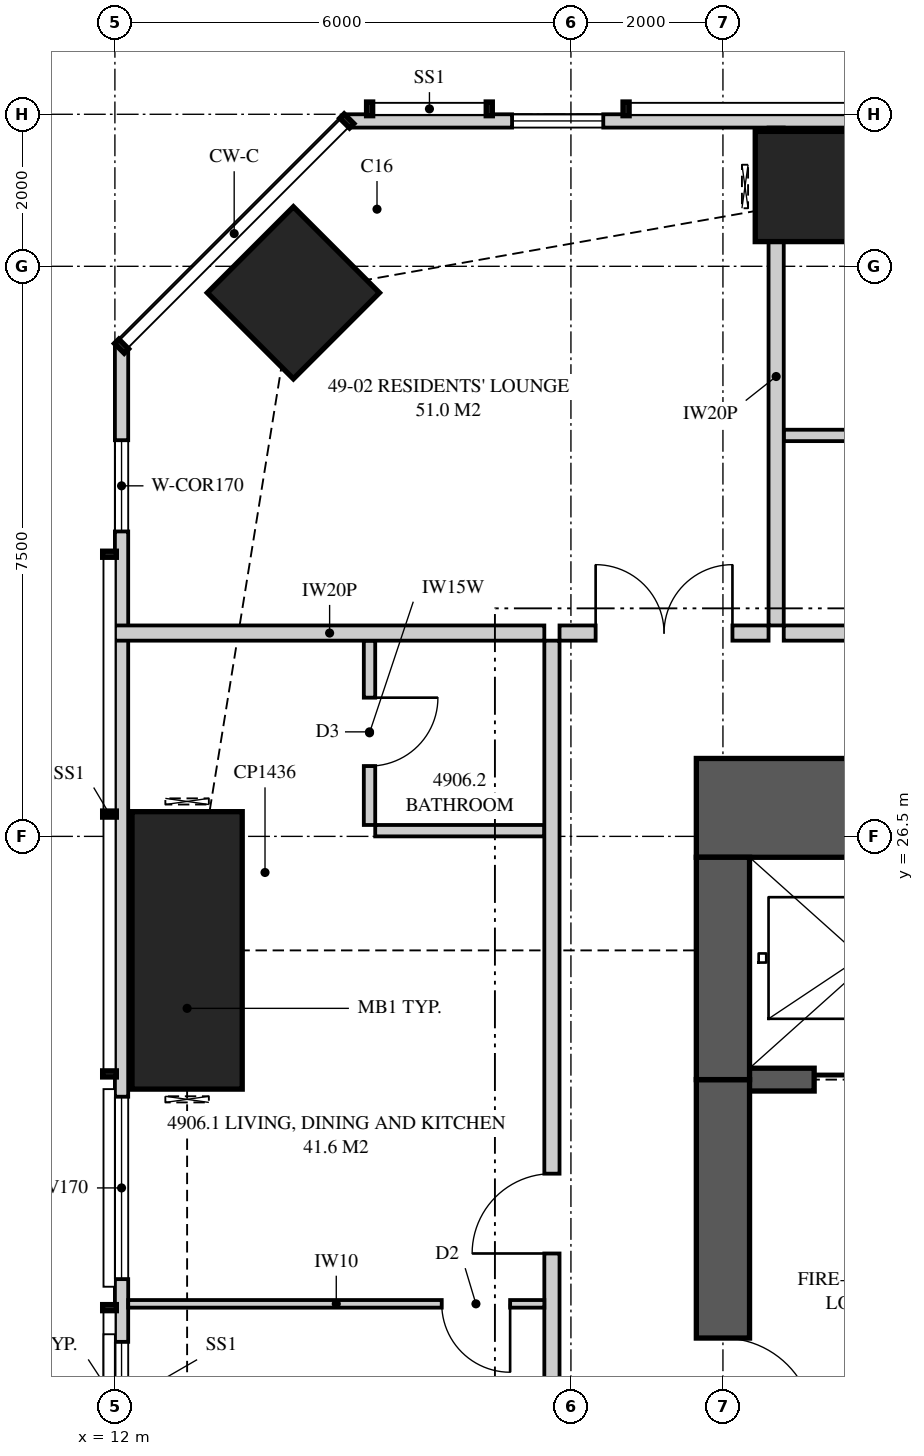
"""IFC4 building model, lengths in metres.
Left out: names, types, materials, properties, quantities, classifications, styles, units other than length and angle.
Written with IfcOpenShell. Run it as: python <this file> out.ifc"""

import sys

from ifc_helpers import new_model, si_unit, direction, frame, frame_2d, origin, origin_2d, place, context, subcontext, project, spatial, polyline, rectangle, outline, extrude, element, fill, save


model = new_model("IFC4")
c1 = context("Model", 3, precision=1e-05, world=origin(), true_north=direction((0.0, 1.0)))
c2 = subcontext(c1, "Body", "Model", "MODEL_VIEW")
j1 = project(units=[si_unit("LENGTHUNIT", "METRE"), si_unit("PLANEANGLEUNIT", "RADIAN")], contexts=[c1])
p1 = place(None, origin())
s1 = spatial("IfcSite", under=j1, at=p1, CompositionType="ELEMENT")
p2 = place(p1, origin())
s2 = spatial("IfcBuilding", under=s1, at=p2, CompositionType="ELEMENT")
p3 = place(p2, frame((0.0, 0.0, 181.15)))
s3 = spatial("IfcBuildingStorey", under=s2, at=p3, CompositionType="ELEMENT", Elevation=181.15)
p4 = place(p3, frame((22.25, 35.05, 0.0), z_axis=(0.0, 0.0, 1.0), x_axis=(0.0, 1.0, 0.0)))
e1 = element("IfcColumn", 1, at=p4, inside=s3, PredefinedType="COLUMN", context=c2, shape_type="SweptSolid", body=[
    extrude(rectangle(XDim=1.45, YDim=3.65, at=origin_2d()), origin(), (0.0, 0.0, 1.0), 3.35),
])
p5 = place(p3, frame((14.348, 33.652, 0.0), z_axis=(0.0, 0.0, 1.0), x_axis=(0.707106781187, 0.707106781187, 0.0)))
e2 = element("IfcColumn", 2, at=p5, inside=s3, PredefinedType="COLUMN", context=c2, shape_type="SweptSolid", body=[
    extrude(rectangle(XDim=1.6, YDim=1.6, at=origin_2d()), origin(), (0.0, 0.0, 1.0), 3.35),
])
p6 = place(p3, frame((12.95, 25.0, 0.0), z_axis=(0.0, 0.0, 1.0), x_axis=(1.0, 0.0, 0.0)))
e3 = element("IfcColumn", 3, at=p6, inside=s3, PredefinedType="COLUMN", context=c2, shape_type="SweptSolid", body=[
    extrude(rectangle(XDim=1.45, YDim=3.65, at=origin_2d()), origin(), (0.0, 0.0, 1.0), 3.35),
])
p7 = place(p3, frame((26.0, 26.875, 0.0), z_axis=(0.0, 0.0, 1.0), x_axis=(-1.0, 0.0, 0.0)))
e4 = element("IfcWall", 4, at=p7, inside=s3, PredefinedType="SHEAR", context=c2, shape_type="SweptSolid", body=[
    extrude(rectangle(XDim=6.35, YDim=1.3, at=frame_2d((3.175, 0.0))), origin(), (0.0, 0.0, 1.0), 3.35),
])
p8 = place(p7, frame((0.825, 0.0, 0.0)))
e5 = element("IfcOpeningElement", 5, at=p8, cuts=e4, PredefinedType="OPENING", context=c2, shape_type="SweptSolid", body=[
    extrude(rectangle(XDim=0.75, YDim=2.1, at=frame_2d((0.375, 1.05))), frame((0.0, 0.66, 0.0), z_axis=(0.0, -1.0, 0.0), x_axis=(1.0, 0.0, 0.0)), (0.0, 0.0, 1.0), 1.32),
])
p9 = place(p3, frame((20.0, 26.225, 0.0), z_axis=(0.0, 0.0, 1.0), x_axis=(0.0, -1.0, 0.0)))
e6 = element("IfcWall", 6, at=p9, inside=s3, PredefinedType="SHEAR", context=c2, shape_type="SweptSolid", body=[
    extrude(rectangle(XDim=2.925, YDim=0.7, at=frame_2d((1.462, 0.0))), origin(), (0.0, 0.0, 1.0), 3.35),
])
p10 = place(p3, frame((20.0, 23.3, 0.0), z_axis=(0.0, 0.0, 1.0), x_axis=(0.0, -1.0, 0.0)))
e7 = element("IfcWall", 7, at=p10, inside=s3, PredefinedType="SHEAR", context=c2, shape_type="SweptSolid", body=[
    extrude(rectangle(XDim=5.6, YDim=0.7, at=frame_2d((2.8, 0.0))), origin(), (0.0, 0.0, 1.0), 3.35),
])
p11 = place(p10, frame((3.4, 0.0, 0.0)))
e8 = element("IfcOpeningElement", 8, at=p11, cuts=e7, PredefinedType="OPENING", context=c2, shape_type="SweptSolid", body=[
    extrude(rectangle(XDim=1.2, YDim=2.2, at=frame_2d((0.6, 1.1))), frame((0.0, 0.36, 0.0), z_axis=(0.0, -1.0, 0.0), x_axis=(1.0, 0.0, 0.0)), (0.0, 0.0, 1.0), 0.72),
])
p12 = place(p3, frame((20.0, 23.3, 0.0), z_axis=(0.0, 0.0, 1.0), x_axis=(1.0, 0.0, 0.0)))
e9 = element("IfcWall", 9, at=p12, inside=s3, PredefinedType="SHEAR", context=c2, shape_type="SweptSolid", body=[
    extrude(rectangle(XDim=3.6, YDim=0.3, at=frame_2d((1.8, 0.0))), origin(), (0.0, 0.0, 1.0), 3.35),
])
p13 = place(p12, frame((1.2, 0.0, 0.0)))
e10 = element("IfcOpeningElement", 10, at=p13, cuts=e9, PredefinedType="OPENING", context=c2, shape_type="SweptSolid", body=[
    extrude(rectangle(XDim=1.2, YDim=2.1, at=frame_2d((0.6, 1.05))), frame((0.0, 0.16, 0.0), z_axis=(0.0, -1.0, 0.0), x_axis=(1.0, 0.0, 0.0)), (0.0, 0.0, 1.0), 0.32),
])
p14 = place(p3, frame((49.949, 35.913, 0.0), z_axis=(0.0, 0.0, 1.0), x_axis=(-1.0, 0.0, 0.0)))
e11 = element("IfcWall", 11, at=p14, inside=s3, PredefinedType="SOLIDWALL", context=c2, shape_type="SweptSolid", body=[
    extrude(outline(polyline([(0.0, 0.0), (34.897, 0.0), (34.897, 3.11), (27.91, 3.11), (27.91, 2.15), (27.836, 2.15), (27.836, 3.11), (27.699, 3.11), (27.699, 2.15), (7.199, 2.15), (7.199, 3.11), (7.062, 3.11), (7.062, 2.15), (6.987, 2.15), (6.987, 3.11), (0.0, 3.11), (0.0, 0.0)])), frame((0.0, 0.087, 0.0), z_axis=(0.0, -1.0, 0.0), x_axis=(1.0, 0.0, 0.0)), (0.0, 0.0, 1.0), 0.175),
])
p15 = place(p14, frame((2.149, 0.0, 0.4)))
e12 = element("IfcOpeningElement", 12, at=p15, cuts=e11, PredefinedType="OPENING", context=c2, shape_type="SweptSolid", body=[
    extrude(rectangle(XDim=1.8, YDim=1.7, at=frame_2d((0.9, 0.85))), frame((0.0, 0.097, 0.0), z_axis=(0.0, -1.0, 0.0), x_axis=(1.0, 0.0, 0.0)), (0.0, 0.0, 1.0), 0.195),
])
p16 = place(p14, frame((9.13, 0.0, 0.4)))
e13 = element("IfcOpeningElement", 13, at=p16, cuts=e11, PredefinedType="OPENING", context=c2, shape_type="SweptSolid", body=[
    extrude(rectangle(XDim=1.2, YDim=1.7, at=frame_2d((0.6, 0.85))), frame((0.0, 0.097, 0.0), z_axis=(0.0, -1.0, 0.0), x_axis=(1.0, 0.0, 0.0)), (0.0, 0.0, 1.0), 0.195),
])
p17 = place(p14, frame((13.174, 0.0, 0.0)))
e14 = element("IfcOpeningElement", 14, at=p17, cuts=e11, PredefinedType="OPENING", context=c2, shape_type="SweptSolid", body=[
    extrude(rectangle(XDim=1.8, YDim=2.1, at=frame_2d((0.9, 1.05))), frame((0.0, 0.097, 0.0), z_axis=(0.0, -1.0, 0.0), x_axis=(1.0, 0.0, 0.0)), (0.0, 0.0, 1.0), 0.195),
])
p18 = place(p14, frame((20.724, 0.0, 0.4)))
e15 = element("IfcOpeningElement", 15, at=p18, cuts=e11, PredefinedType="OPENING", context=c2, shape_type="SweptSolid", body=[
    extrude(rectangle(XDim=1.8, YDim=1.7, at=frame_2d((0.9, 0.85))), frame((0.0, 0.097, 0.0), z_axis=(0.0, -1.0, 0.0), x_axis=(1.0, 0.0, 0.0)), (0.0, 0.0, 1.0), 0.195),
])
p19 = place(p14, frame((23.929, 0.0, 0.4)))
e16 = element("IfcOpeningElement", 16, at=p19, cuts=e11, PredefinedType="OPENING", context=c2, shape_type="SweptSolid", body=[
    extrude(rectangle(XDim=1.8, YDim=1.7, at=frame_2d((0.9, 0.85))), frame((0.0, 0.097, 0.0), z_axis=(0.0, -1.0, 0.0), x_axis=(1.0, 0.0, 0.0)), (0.0, 0.0, 1.0), 0.195),
])
p20 = place(p14, frame((31.523, 0.0, 0.4)))
e17 = element("IfcOpeningElement", 17, at=p20, cuts=e11, PredefinedType="OPENING", context=c2, shape_type="SweptSolid", body=[
    extrude(rectangle(XDim=1.2, YDim=1.7, at=frame_2d((0.6, 0.85))), frame((0.0, 0.097, 0.0), z_axis=(0.0, -1.0, 0.0), x_axis=(1.0, 0.0, 0.0)), (0.0, 0.0, 1.0), 0.195),
])
p21 = place(p3, frame((12.087, 32.949, 0.0), z_axis=(0.0, 0.0, 1.0), x_axis=(0.0, -1.0, 0.0)))
e18 = element("IfcWall", 18, at=p21, inside=s3, PredefinedType="SOLIDWALL", context=c2, shape_type="SweptSolid", body=[
    extrude(outline(polyline([(0.0, 0.0), (29.897, 0.0), (29.897, 3.11), (20.191, 3.11), (20.191, 2.15), (20.051, 2.15), (20.051, 3.11), (19.949, 3.11), (19.949, 2.15), (7.949, 2.15), (7.949, 3.11), (7.823, 3.11), (7.823, 2.15), (7.73, 2.15), (7.73, 3.11), (0.0, 3.11), (0.0, 0.0)])), frame((0.0, 0.087, 0.0), z_axis=(0.0, -1.0, 0.0), x_axis=(1.0, 0.0, 0.0)), (0.0, 0.0, 1.0), 0.175),
])
p22 = place(p21, frame((1.237, 0.0, 0.4)))
e19 = element("IfcOpeningElement", 19, at=p22, cuts=e18, PredefinedType="OPENING", context=c2, shape_type="SweptSolid", body=[
    extrude(rectangle(XDim=1.2, YDim=1.7, at=frame_2d((0.6, 0.85))), frame((0.0, 0.097, 0.0), z_axis=(0.0, -1.0, 0.0), x_axis=(1.0, 0.0, 0.0)), (0.0, 0.0, 1.0), 0.195),
])
p23 = place(p21, frame((9.874, 0.0, 0.4)))
e20 = element("IfcOpeningElement", 20, at=p23, cuts=e18, PredefinedType="OPENING", context=c2, shape_type="SweptSolid", body=[
    extrude(rectangle(XDim=2.4, YDim=1.7, at=frame_2d((1.2, 0.85))), frame((0.0, 0.097, 0.0), z_axis=(0.0, -1.0, 0.0), x_axis=(1.0, 0.0, 0.0)), (0.0, 0.0, 1.0), 0.195),
])
p24 = place(p21, frame((13.099, 0.0, 0.4)))
e21 = element("IfcOpeningElement", 21, at=p24, cuts=e18, PredefinedType="OPENING", context=c2, shape_type="SweptSolid", body=[
    extrude(rectangle(XDim=1.8, YDim=1.7, at=frame_2d((0.9, 0.85))), frame((0.0, 0.097, 0.0), z_axis=(0.0, -1.0, 0.0), x_axis=(1.0, 0.0, 0.0)), (0.0, 0.0, 1.0), 0.195),
])
p25 = place(p21, frame((16.219, 0.0, 0.4)))
e22 = element("IfcOpeningElement", 22, at=p25, cuts=e18, PredefinedType="OPENING", context=c2, shape_type="SweptSolid", body=[
    extrude(rectangle(XDim=1.8, YDim=1.7, at=frame_2d((0.9, 0.85))), frame((0.0, 0.097, 0.0), z_axis=(0.0, -1.0, 0.0), x_axis=(1.0, 0.0, 0.0)), (0.0, 0.0, 1.0), 0.195),
])
p26 = place(p21, frame((22.624, 0.0, 0.0)))
e23 = element("IfcOpeningElement", 23, at=p26, cuts=e18, PredefinedType="OPENING", context=c2, shape_type="SweptSolid", body=[
    extrude(rectangle(XDim=1.8, YDim=2.1, at=frame_2d((0.9, 1.05))), frame((0.0, 0.097, 0.0), z_axis=(0.0, -1.0, 0.0), x_axis=(1.0, 0.0, 0.0)), (0.0, 0.0, 1.0), 0.195),
])
p27 = place(p3, frame((20.7, 35.825, 0.0), z_axis=(0.0, 0.0, 1.0), x_axis=(0.0, -1.0, 0.0)))
e24 = element("IfcWall", 24, at=p27, inside=s3, PredefinedType="PARTITIONING", context=c2, shape_type="SweptSolid", body=[
    extrude(outline(polyline([(0.0, 0.0), (6.55, 0.0), (6.55, 3.11), (1.973, 3.11), (1.973, 2.15), (0.125, 2.15), (0.125, 3.11), (0.0, 3.11), (0.0, 0.0)])), frame((0.0, 0.1, 0.0), z_axis=(0.0, -1.0, 0.0), x_axis=(1.0, 0.0, 0.0)), (0.0, 0.0, 1.0), 0.2),
])
p28 = place(p3, frame((17.85, 29.175, 0.0), z_axis=(0.0, 0.0, 1.0), x_axis=(1.0, 0.0, 0.0)))
e25 = element("IfcWall", 25, at=p28, inside=s3, PredefinedType="PARTITIONING", context=c2, shape_type="SweptSolid", body=[
    extrude(rectangle(XDim=2.75, YDim=0.2, at=frame_2d((1.375, 0.0))), origin(), (0.0, 0.0, 1.0), 3.11),
])
p29 = place(p28, frame((0.475, 0.0, 0.0)))
e26 = element("IfcOpeningElement", 26, at=p29, cuts=e25, PredefinedType="OPENING", context=c2, shape_type="SweptSolid", body=[
    extrude(rectangle(XDim=1.8, YDim=2.1, at=frame_2d((0.9, 1.05))), frame((0.0, 0.11, 0.0), z_axis=(0.0, -1.0, 0.0), x_axis=(1.0, 0.0, 0.0)), (0.0, 0.0, 1.0), 0.22),
])
p30 = place(p3, frame((20.8, 29.175, 0.0), z_axis=(0.0, 0.0, 1.0), x_axis=(1.0, 0.0, 0.0)))
e27 = element("IfcWall", 27, at=p30, inside=s3, PredefinedType="PARTITIONING", context=c2, shape_type="SweptSolid", body=[
    extrude(outline(polyline([(0.0, 0.0), (14.85, 0.0), (14.85, 3.11), (12.037, 3.11), (12.037, 2.541), (11.363, 2.541), (11.363, 3.11), (1.787, 3.11), (1.787, 2.541), (1.113, 2.541), (1.113, 3.11), (0.0, 3.11), (0.0, 0.0)])), frame((0.0, 0.1, 0.0), z_axis=(0.0, -1.0, 0.0), x_axis=(1.0, 0.0, 0.0)), (0.0, 0.0, 1.0), 0.2),
])
p31 = place(p3, frame((20.8, 31.775, 0.0), z_axis=(0.0, 0.0, 1.0), x_axis=(1.0, 0.0, 0.0)))
e28 = element("IfcWall", 28, at=p31, inside=s3, PredefinedType="PLUMBINGWALL", context=c2, shape_type="SweptSolid", body=[
    extrude(outline(polyline([(0.0, 0.0), (5.65, 0.0), (5.65, 3.11), (1.762, 3.11), (1.762, 2.541), (1.138, 2.541), (1.138, 3.11), (0.0, 3.11), (0.0, 0.0)])), frame((0.0, 0.075, 0.0), z_axis=(0.0, -1.0, 0.0), x_axis=(1.0, 0.0, 0.0)), (0.0, 0.0, 1.0), 0.15),
])
p32 = place(p3, frame((12.0, 29.175, 0.0), z_axis=(0.0, 0.0, 1.0), x_axis=(1.0, 0.0, 0.0)))
e29 = element("IfcWall", 29, at=p32, inside=s3, PredefinedType="PARTITIONING", context=c2, shape_type="SweptSolid", body=[
    extrude(outline(polyline([(0.0, 0.0), (5.65, 0.0), (5.65, 3.11), (2.547, 3.11), (2.547, 2.15), (0.703, 2.15), (0.703, 3.11), (0.0, 3.11), (0.0, 0.0)])), frame((0.0, 0.1, 0.0), z_axis=(0.0, -1.0, 0.0), x_axis=(1.0, 0.0, 0.0)), (0.0, 0.0, 1.0), 0.2),
])
p33 = place(p3, frame((17.75, 13.95, 0.0), z_axis=(0.0, 0.0, 1.0), x_axis=(0.0, 1.0, 0.0)))
e30 = element("IfcWall", 30, at=p33, inside=s3, PredefinedType="PARTITIONING", context=c2, shape_type="SweptSolid", body=[
    extrude(outline(polyline([(0.0, 0.0), (15.125, 0.0), (15.125, 3.11), (11.387, 3.11), (11.387, 2.541), (10.713, 2.541), (10.713, 3.11), (0.0, 3.11), (0.0, 0.0)])), frame((0.0, 0.1, 0.0), z_axis=(0.0, -1.0, 0.0), x_axis=(1.0, 0.0, 0.0)), (0.0, 0.0, 1.0), 0.2),
])
p34 = place(p33, frame((7.062, 0.0, 0.0)))
e31 = element("IfcOpeningElement", 31, at=p34, cuts=e30, PredefinedType="OPENING", context=c2, shape_type="SweptSolid", body=[
    extrude(rectangle(XDim=1.05, YDim=2.2, at=frame_2d((0.525, 1.1))), frame((0.0, 0.11, 0.0), z_axis=(0.0, -1.0, 0.0), x_axis=(1.0, 0.0, 0.0)), (0.0, 0.0, 1.0), 0.22),
])
p35 = place(p3, frame((15.35, 26.65, 0.0), z_axis=(0.0, 0.0, 1.0), x_axis=(0.0, 1.0, 0.0)))
e32 = element("IfcWall", 32, at=p35, inside=s3, PredefinedType="PLUMBINGWALL", context=c2, shape_type="SweptSolid", body=[
    extrude(rectangle(XDim=2.425, YDim=0.15, at=frame_2d((1.212, 0.0))), origin(), (0.0, 0.0, 1.0), 3.11),
])
p36 = place(p35, frame((0.775, 0.0, 0.0)))
e33 = element("IfcOpeningElement", 33, at=p36, cuts=e32, PredefinedType="OPENING", context=c2, shape_type="SweptSolid", body=[
    extrude(rectangle(XDim=0.9, YDim=2.1, at=frame_2d((0.45, 1.05))), frame((0.0, 0.085, 0.0), z_axis=(0.0, -1.0, 0.0), x_axis=(1.0, 0.0, 0.0)), (0.0, 0.0, 1.0), 0.17),
])
p37 = place(p3, frame((15.425, 26.575, 0.0), z_axis=(0.0, 0.0, 1.0), x_axis=(1.0, 0.0, 0.0)))
e34 = element("IfcWall", 34, at=p37, inside=s3, PredefinedType="PLUMBINGWALL", context=c2, shape_type="SweptSolid", body=[
    extrude(rectangle(XDim=2.225, YDim=0.15, at=frame_2d((1.112, 0.0))), origin(), (0.0, 0.0, 1.0), 3.11),
])
p38 = place(p3, frame((12.175, 20.35, 0.0), z_axis=(0.0, 0.0, 1.0), x_axis=(1.0, 0.0, 0.0)))
e35 = element("IfcWall", 35, at=p38, inside=s3, PredefinedType="PARTITIONING", context=c2, shape_type="SweptSolid", body=[
    extrude(outline(polyline([(0.0, 0.0), (5.475, 0.0), (5.475, 3.11), (1.635, 3.11), (1.635, 2.15), (0.0, 2.15), (0.0, 3.11), (0.0, 0.0)])), frame((0.0, 0.05, 0.0), z_axis=(0.0, -1.0, 0.0), x_axis=(1.0, 0.0, 0.0)), (0.0, 0.0, 1.0), 0.1),
])
p39 = place(p38, frame((4.125, 0.0, 0.0)))
e36 = element("IfcOpeningElement", 36, at=p39, cuts=e35, PredefinedType="OPENING", context=c2, shape_type="SweptSolid", body=[
    extrude(rectangle(XDim=0.9, YDim=2.1, at=frame_2d((0.45, 1.05))), frame((0.0, 0.06, 0.0), z_axis=(0.0, -1.0, 0.0), x_axis=(1.0, 0.0, 0.0)), (0.0, 0.0, 1.0), 0.12),
])
p40 = place(p20, origin())
e37 = element("IfcWindow", 37, at=p40, inside=s3, PartitioningType="SINGLE_PANEL", PredefinedType="WINDOW", context=c2, shape_type="SweptSolid", body=[
    extrude(rectangle(XDim=1.2, YDim=1.7, at=frame_2d((0.6, 0.85))), frame((0.0, 0.03, 0.0), z_axis=(0.0, -1.0, 0.0), x_axis=(1.0, 0.0, 0.0)), (0.0, 0.0, 1.0), 0.06),
])
fill(e17, e37)
p41 = place(p22, origin())
e38 = element("IfcWindow", 38, at=p41, inside=s3, PartitioningType="SINGLE_PANEL", PredefinedType="WINDOW", context=c2, shape_type="SweptSolid", body=[
    extrude(rectangle(XDim=1.2, YDim=1.7, at=frame_2d((0.6, 0.85))), frame((0.0, 0.03, 0.0), z_axis=(0.0, -1.0, 0.0), x_axis=(1.0, 0.0, 0.0)), (0.0, 0.0, 1.0), 0.06),
])
fill(e19, e38)
p42 = place(p23, origin())
e39 = element("IfcWindow", 39, at=p42, inside=s3, PartitioningType="SINGLE_PANEL", PredefinedType="WINDOW", context=c2, shape_type="SweptSolid", body=[
    extrude(rectangle(XDim=2.4, YDim=1.7, at=frame_2d((1.2, 0.85))), frame((0.0, 0.03, 0.0), z_axis=(0.0, -1.0, 0.0), x_axis=(1.0, 0.0, 0.0)), (0.0, 0.0, 1.0), 0.06),
])
fill(e20, e39)
p43 = place(p24, origin())
e40 = element("IfcWindow", 40, at=p43, inside=s3, PartitioningType="SINGLE_PANEL", PredefinedType="WINDOW", context=c2, shape_type="SweptSolid", body=[
    extrude(rectangle(XDim=1.8, YDim=1.7, at=frame_2d((0.9, 0.85))), frame((0.0, 0.03, 0.0), z_axis=(0.0, -1.0, 0.0), x_axis=(1.0, 0.0, 0.0)), (0.0, 0.0, 1.0), 0.06),
])
fill(e21, e40)
p44 = place(p29, origin())
e41 = element("IfcDoor", 41, at=p44, inside=s3, OperationType="DOUBLE_DOOR_SINGLE_SWING", PredefinedType="DOOR", context=c2, shape_type="SweptSolid", body=[
    extrude(rectangle(XDim=1.8, YDim=2.1, at=frame_2d((0.9, 1.05))), frame((0.0, 0.025, 0.0), z_axis=(0.0, -1.0, 0.0), x_axis=(1.0, 0.0, 0.0)), (0.0, 0.0, 1.0), 0.05),
])
fill(e26, e41)
p45 = place(p34, origin())
e42 = element("IfcDoor", 42, at=p45, inside=s3, OperationType="SINGLE_SWING_LEFT", PredefinedType="DOOR", context=c2, shape_type="SweptSolid", body=[
    extrude(rectangle(XDim=1.05, YDim=2.2, at=frame_2d((0.525, 1.1))), frame((0.0, 0.025, 0.0), z_axis=(0.0, -1.0, 0.0), x_axis=(1.0, 0.0, 0.0)), (0.0, 0.0, 1.0), 0.05),
])
fill(e31, e42)
p46 = place(p36, frame((0.9, 0.0, 0.0), z_axis=(0.0, 0.0, 1.0), x_axis=(-1.0, 0.0, 0.0)))
e43 = element("IfcDoor", 43, at=p46, inside=s3, OperationType="SINGLE_SWING_LEFT", PredefinedType="DOOR", context=c2, shape_type="SweptSolid", body=[
    extrude(rectangle(XDim=0.9, YDim=2.1, at=frame_2d((0.45, 1.05))), frame((0.0, 0.025, 0.0), z_axis=(0.0, -1.0, 0.0), x_axis=(1.0, 0.0, 0.0)), (0.0, 0.0, 1.0), 0.05),
])
fill(e33, e43)
p47 = place(p39, frame((0.9, 0.0, 0.0), z_axis=(0.0, 0.0, 1.0), x_axis=(-1.0, 0.0, 0.0)))
e44 = element("IfcDoor", 44, at=p47, inside=s3, OperationType="SINGLE_SWING_LEFT", PredefinedType="DOOR", context=c2, shape_type="SweptSolid", body=[
    extrude(rectangle(XDim=0.9, YDim=2.1, at=frame_2d((0.45, 1.05))), frame((0.0, 0.025, 0.0), z_axis=(0.0, -1.0, 0.0), x_axis=(1.0, 0.0, 0.0)), (0.0, 0.0, 1.0), 0.05),
])
fill(e36, e44)
p48 = place(p11, origin())
e45 = element("IfcDoor", 45, at=p48, inside=s3, OperationType="SINGLE_SWING_RIGHT", PredefinedType="DOOR", context=c2, shape_type="SweptSolid", body=[
    extrude(rectangle(XDim=1.2, YDim=2.2, at=frame_2d((0.6, 1.1))), frame((0.0, 0.025, 0.0), z_axis=(0.0, -1.0, 0.0), x_axis=(1.0, 0.0, 0.0)), (0.0, 0.0, 1.0), 0.05),
])
fill(e8, e45)
p49 = place(p13, origin())
e46 = element("IfcDoor", 46, at=p49, inside=s3, OperationType="SLIDING_TO_LEFT", PredefinedType="DOOR", context=c2, shape_type="SweptSolid", body=[
    extrude(rectangle(XDim=1.2, YDim=2.1, at=frame_2d((0.6, 1.05))), frame((0.0, 0.025, 0.0), z_axis=(0.0, -1.0, 0.0), x_axis=(1.0, 0.0, 0.0)), (0.0, 0.0, 1.0), 0.05),
])
fill(e10, e46)
save(model, sys.argv[1])
